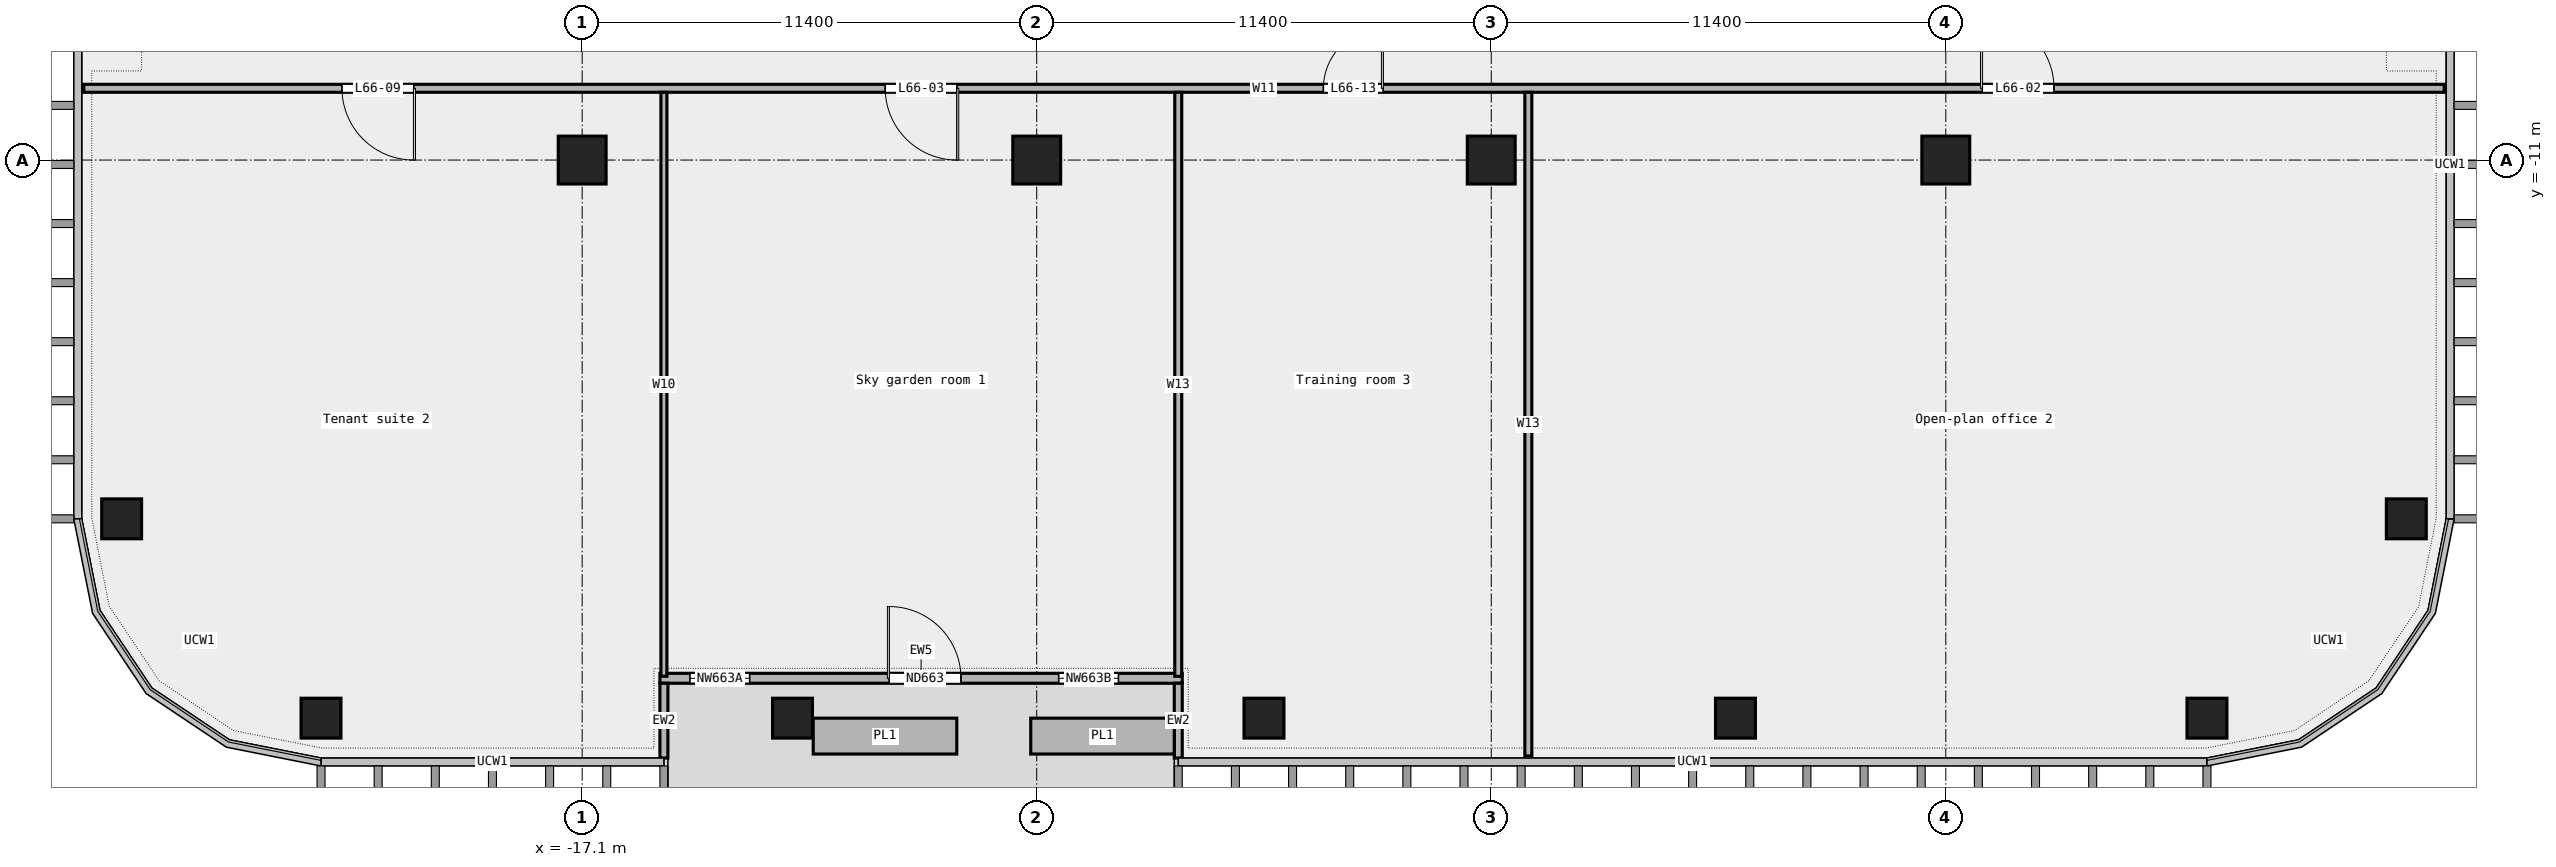
"""IFC4 building model, lengths in metres.
Left out: names, types, materials, properties, quantities, classifications, styles, units other than length and angle.
Written with IfcOpenShell. Run it as: python <this file> out.ifc"""

import sys

from ifc_helpers import new_model, si_unit, direction, frame, frame_2d, origin, origin_2d, place, context, subcontext, project, spatial, rectangle, extrude, element, fill, save


model = new_model("IFC4")
c1 = context("Model", 3, precision=1e-05, world=origin(), true_north=direction((0.0, 1.0)))
c2 = subcontext(c1, "Body", "Model", "MODEL_VIEW")
j1 = project(units=[si_unit("LENGTHUNIT", "METRE"), si_unit("PLANEANGLEUNIT", "RADIAN")], contexts=[c1])
p1 = place(None, origin())
s1 = spatial("IfcSite", under=j1, at=p1, CompositionType="ELEMENT")
p2 = place(p1, origin())
s2 = spatial("IfcBuilding", under=s1, at=p2, CompositionType="ELEMENT")
p3 = place(p2, frame((0.0, 0.0, 303.4)))
s3 = spatial("IfcBuildingStorey", under=s2, at=p3, CompositionType="ELEMENT", Elevation=303.4)
for number, where, z_axis, x_axis in (
    (1, (-23.65, -25.0, 0.0), (0.0, 0.0, 1.0), (1.0, 0.0, 0.0)),
    (2, (-11.825, -25.0, 0.0), (0.0, 0.0, 1.0), (1.0, 0.0, 0.0)),
    (3, (0.0, -25.0, 0.0), (0.0, 0.0, 1.0), (1.0, 0.0, 0.0)),
    (4, (11.825, -25.0, 0.0), (0.0, 0.0, 1.0), (1.0, 0.0, 0.0)),
    (5, (23.65, -25.0, 0.0), (0.0, 0.0, 1.0), (1.0, 0.0, 0.0)),
    (6, (28.65, -20.0, 0.0), (0.0, 0.0, 1.0), (1.0, 0.0, 0.0)),
    (7, (-28.65, -20.0, 0.0), (0.0, 0.0, 1.0), (1.0, 0.0, 0.0)),
):
    element("IfcColumn", number, at=place(p3, frame(where, z_axis=z_axis, x_axis=x_axis)), inside=s3, PredefinedType="COLUMN", context=c2, shape_type="SweptSolid", body=[
        extrude(rectangle(XDim=1.0, YDim=1.0, at=origin_2d()), origin(), (0.0, 0.0, 1.0), 3.6),
    ])
for number, where, z_axis, x_axis in (
    (8, (-17.1, -11.0, 0.0), (0.0, 0.0, 1.0), (1.0, 0.0, 0.0)),
    (9, (-5.7, -11.0, 0.0), (0.0, 0.0, 1.0), (1.0, 0.0, 0.0)),
    (10, (5.7, -11.0, 0.0), (0.0, 0.0, 1.0), (1.0, 0.0, 0.0)),
    (11, (17.1, -11.0, 0.0), (0.0, 0.0, 1.0), (1.0, 0.0, 0.0)),
):
    element("IfcColumn", number, at=place(p3, frame(where, z_axis=z_axis, x_axis=x_axis)), inside=s3, PredefinedType="COLUMN", context=c2, shape_type="SweptSolid", body=[
        extrude(rectangle(XDim=1.2, YDim=1.2, at=origin_2d()), origin(), (0.0, 0.0, 1.0), 3.6),
    ])
p4 = place(p3, frame((-15.15, -24.0, 0.0), z_axis=(0.0, 0.0, 1.0), x_axis=(1.0, 0.0, 0.0)))
e12 = element("IfcWall", 12, at=p4, inside=s3, PredefinedType="STANDARD", context=c2, shape_type="SweptSolid", body=[
    extrude(rectangle(XDim=13.1, YDim=0.25, at=frame_2d((6.55, 0.0))), origin(), (0.0, 0.0, 1.0), 3.6),
])
p5 = place(p4, frame((0.75, 0.0, 0.45)))
e13 = element("IfcOpeningElement", 13, at=p5, cuts=e12, PredefinedType="OPENING", context=c2, shape_type="SweptSolid", body=[
    extrude(rectangle(XDim=1.5, YDim=2.4, at=frame_2d((0.75, 1.2))), frame((0.0, 0.137, 0.0), z_axis=(0.0, -1.0, 0.0), x_axis=(1.0, 0.0, 0.0)), (0.0, 0.0, 1.0), 0.274),
])
p6 = place(p4, frame((5.75, 0.0, 0.0)))
e14 = element("IfcOpeningElement", 14, at=p6, cuts=e12, PredefinedType="OPENING", context=c2, shape_type="SweptSolid", body=[
    extrude(rectangle(XDim=1.8, YDim=2.4, at=frame_2d((0.9, 1.2))), frame((0.0, 0.137, 0.0), z_axis=(0.0, -1.0, 0.0), x_axis=(1.0, 0.0, 0.0)), (0.0, 0.0, 1.0), 0.274),
])
p7 = place(p4, frame((10.0, 0.0, 0.45)))
e15 = element("IfcOpeningElement", 15, at=p7, cuts=e12, PredefinedType="OPENING", context=c2, shape_type="SweptSolid", body=[
    extrude(rectangle(XDim=1.5, YDim=2.4, at=frame_2d((0.75, 1.2))), frame((0.0, 0.137, 0.0), z_axis=(0.0, -1.0, 0.0), x_axis=(1.0, 0.0, 0.0)), (0.0, 0.0, 1.0), 0.274),
])
for number, where, z_axis, x_axis in (
    (16, (-15.05, -26.0, 0.0), (0.0, 0.0, 1.0), (0.0, 1.0, 0.0)),
    (17, (-2.15, -26.0, 0.0), (0.0, 0.0, 1.0), (0.0, 1.0, 0.0)),
):
    element("IfcWall", number, at=place(p3, frame(where, z_axis=z_axis, x_axis=x_axis)), inside=s3, PredefinedType="STANDARD", context=c2, shape_type="SweptSolid", body=[
        extrude(rectangle(XDim=1.875, YDim=0.2, at=frame_2d((0.938, 0.0))), origin(), (0.0, 0.0, 1.0), 3.6),
    ])
for number, where, z_axis, x_axis in (
    (18, (-11.305, -25.45, 0.0), (0.0, 0.0, 1.0), (1.0, 0.0, 0.0)),
    (19, (-5.85, -25.45, 0.0), (0.0, 0.0, 1.0), (1.0, 0.0, 0.0)),
):
    element("IfcWall", number, at=place(p3, frame(where, z_axis=z_axis, x_axis=x_axis)), inside=s3, PredefinedType="STANDARD", context=c2, shape_type="SweptSolid", body=[
        extrude(rectangle(XDim=3.6, YDim=0.9, at=frame_2d((1.8, 0.0))), origin(), (0.0, 0.0, 1.0), 0.7),
    ])
p8 = place(p3, frame((-29.6, -9.2, 0.0), z_axis=(0.0, 0.0, 1.0), x_axis=(1.0, 0.0, 0.0)))
e20 = element("IfcWall", 20, at=p8, inside=s3, PredefinedType="PARTITIONING", context=c2, shape_type="SweptSolid", body=[
    extrude(rectangle(XDim=59.2, YDim=0.2, at=frame_2d((29.6, 0.0))), origin(), (0.0, 0.0, 1.0), 3.6),
])
p9 = place(p8, frame((47.615, 0.0, 0.0)))
e21 = element("IfcOpeningElement", 21, at=p9, cuts=e20, PredefinedType="OPENING", context=c2, shape_type="SweptSolid", body=[
    extrude(rectangle(XDim=1.8, YDim=2.1, at=frame_2d((0.9, 1.05))), frame((0.0, 0.112, 0.0), z_axis=(0.0, -1.0, 0.0), x_axis=(1.0, 0.0, 0.0)), (0.0, 0.0, 1.0), 0.224),
])
p10 = place(p8, frame((20.1, 0.0, 0.0)))
e22 = element("IfcOpeningElement", 22, at=p10, cuts=e20, PredefinedType="OPENING", context=c2, shape_type="SweptSolid", body=[
    extrude(rectangle(XDim=1.8, YDim=2.1, at=frame_2d((0.9, 1.05))), frame((0.0, 0.112, 0.0), z_axis=(0.0, -1.0, 0.0), x_axis=(1.0, 0.0, 0.0)), (0.0, 0.0, 1.0), 0.224),
])
p11 = place(p8, frame((6.475, 0.0, 0.0)))
e23 = element("IfcOpeningElement", 23, at=p11, cuts=e20, PredefinedType="OPENING", context=c2, shape_type="SweptSolid", body=[
    extrude(rectangle(XDim=1.8, YDim=2.1, at=frame_2d((0.9, 1.05))), frame((0.0, 0.112, 0.0), z_axis=(0.0, -1.0, 0.0), x_axis=(1.0, 0.0, 0.0)), (0.0, 0.0, 1.0), 0.224),
])
p12 = place(p8, frame((31.09, 0.0, 0.0)))
e24 = element("IfcOpeningElement", 24, at=p12, cuts=e20, PredefinedType="OPENING", context=c2, shape_type="SweptSolid", body=[
    extrude(rectangle(XDim=1.5, YDim=2.1, at=frame_2d((0.75, 1.05))), frame((0.0, 0.112, 0.0), z_axis=(0.0, -1.0, 0.0), x_axis=(1.0, 0.0, 0.0)), (0.0, 0.0, 1.0), 0.224),
])
p13 = place(p3, frame((-15.05, -23.95, 0.0), z_axis=(0.0, 0.0, 1.0), x_axis=(0.0, 1.0, 0.0)))
e25 = element("IfcWall", 25, at=p13, inside=s3, PredefinedType="PARTITIONING", context=c2, shape_type="SweptSolid", body=[
    extrude(rectangle(XDim=14.65, YDim=0.15, at=frame_2d((7.325, 0.0))), origin(), (0.0, 0.0, 1.0), 3.6),
])
p14 = place(p3, frame((-2.15, -23.95, 0.0), z_axis=(0.0, 0.0, 1.0), x_axis=(0.0, 1.0, 0.0)))
e26 = element("IfcWall", 26, at=p14, inside=s3, PredefinedType="PARTITIONING", context=c2, shape_type="SweptSolid", body=[
    extrude(rectangle(XDim=14.65, YDim=0.175, at=frame_2d((7.325, 0.0))), origin(), (0.0, 0.0, 1.0), 3.6),
])
p15 = place(p3, frame((6.63, -25.95, 0.0), z_axis=(0.0, 0.0, 1.0), x_axis=(0.0, 1.0, 0.0)))
e27 = element("IfcWall", 27, at=p15, inside=s3, PredefinedType="PARTITIONING", context=c2, shape_type="SweptSolid", body=[
    extrude(rectangle(XDim=16.65, YDim=0.175, at=frame_2d((8.325, 0.0))), origin(), (0.0, 0.0, 1.0), 3.6),
])
p16 = place(p5, origin())
e28 = element("IfcWindow", 28, at=p16, inside=s3, PartitioningType="SINGLE_PANEL", PredefinedType="WINDOW", context=c2, shape_type="SweptSolid", body=[
    extrude(rectangle(XDim=1.5, YDim=2.4, at=frame_2d((0.75, 1.2))), frame((0.0, 0.03, 0.0), z_axis=(0.0, -1.0, 0.0), x_axis=(1.0, 0.0, 0.0)), (0.0, 0.0, 1.0), 0.06),
])
fill(e13, e28)
p17 = place(p6, origin())
e29 = element("IfcDoor", 29, at=p17, inside=s3, OperationType="DOUBLE_DOOR_SINGLE_SWING", PredefinedType="DOOR", context=c2, shape_type="SweptSolid", body=[
    extrude(rectangle(XDim=1.8, YDim=2.4, at=frame_2d((0.9, 1.2))), frame((0.0, 0.025, 0.0), z_axis=(0.0, -1.0, 0.0), x_axis=(1.0, 0.0, 0.0)), (0.0, 0.0, 1.0), 0.05),
])
fill(e14, e29)
p18 = place(p7, origin())
e30 = element("IfcWindow", 30, at=p18, inside=s3, PartitioningType="SINGLE_PANEL", PredefinedType="WINDOW", context=c2, shape_type="SweptSolid", body=[
    extrude(rectangle(XDim=1.5, YDim=2.4, at=frame_2d((0.75, 1.2))), frame((0.0, 0.03, 0.0), z_axis=(0.0, -1.0, 0.0), x_axis=(1.0, 0.0, 0.0)), (0.0, 0.0, 1.0), 0.06),
])
fill(e15, e30)
p19 = place(p9, origin())
e31 = element("IfcDoor", 31, at=p19, inside=s3, OperationType="DOUBLE_DOOR_SINGLE_SWING", PredefinedType="DOOR", context=c2, shape_type="SweptSolid", body=[
    extrude(rectangle(XDim=1.8, YDim=2.1, at=frame_2d((0.9, 1.05))), frame((0.0, 0.025, 0.0), z_axis=(0.0, -1.0, 0.0), x_axis=(1.0, 0.0, 0.0)), (0.0, 0.0, 1.0), 0.05),
])
fill(e21, e31)
p20 = place(p10, origin())
e32 = element("IfcDoor", 32, at=p20, inside=s3, OperationType="DOUBLE_DOOR_SINGLE_SWING", PredefinedType="DOOR", context=c2, shape_type="SweptSolid", body=[
    extrude(rectangle(XDim=1.8, YDim=2.1, at=frame_2d((0.9, 1.05))), frame((0.0, 0.025, 0.0), z_axis=(0.0, -1.0, 0.0), x_axis=(1.0, 0.0, 0.0)), (0.0, 0.0, 1.0), 0.05),
])
fill(e22, e32)
p21 = place(p11, origin())
e33 = element("IfcDoor", 33, at=p21, inside=s3, OperationType="DOUBLE_DOOR_SINGLE_SWING", PredefinedType="DOOR", context=c2, shape_type="SweptSolid", body=[
    extrude(rectangle(XDim=1.8, YDim=2.1, at=frame_2d((0.9, 1.05))), frame((0.0, 0.025, 0.0), z_axis=(0.0, -1.0, 0.0), x_axis=(1.0, 0.0, 0.0)), (0.0, 0.0, 1.0), 0.05),
])
fill(e23, e33)
p22 = place(p12, origin())
e34 = element("IfcDoor", 34, at=p22, inside=s3, OperationType="DOUBLE_DOOR_SINGLE_SWING", PredefinedType="DOOR", context=c2, shape_type="SweptSolid", body=[
    extrude(rectangle(XDim=1.5, YDim=2.1, at=frame_2d((0.75, 1.05))), frame((0.0, 0.025, 0.0), z_axis=(0.0, -1.0, 0.0), x_axis=(1.0, 0.0, 0.0)), (0.0, 0.0, 1.0), 0.05),
])
fill(e24, e34)
save(model, sys.argv[1])
